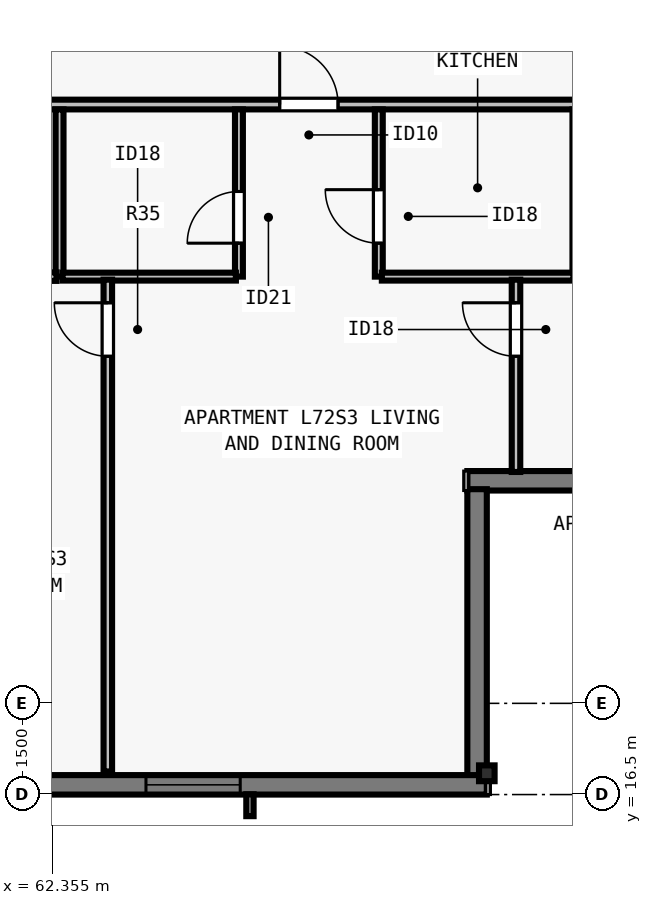
"""IFC4 building model, lengths in metres.
Left out: names, types, materials, properties, quantities, classifications, styles, units other than length and angle.
Written with IfcOpenShell. Run it as: python <this file> out.ifc"""

import sys

from ifc_helpers import new_model, si_unit, direction, frame, frame_2d, origin, origin_2d, place, context, subcontext, project, spatial, rectangle, i_section, extrude, element, fill, save


model = new_model("IFC4")
c1 = context("Model", 3, precision=1e-05, world=origin(), true_north=direction((0.0, 1.0)))
c2 = subcontext(c1, "Body", "Model", "MODEL_VIEW")
j1 = project(units=[si_unit("LENGTHUNIT", "METRE"), si_unit("PLANEANGLEUNIT", "RADIAN")], contexts=[c1])
p1 = place(None, origin())
s1 = spatial("IfcSite", under=j1, at=p1, CompositionType="ELEMENT")
p2 = place(p1, origin())
s2 = spatial("IfcBuilding", under=s1, at=p2, CompositionType="ELEMENT")
p3 = place(p2, frame((0.0, 0.0, 262.0)))
s3 = spatial("IfcBuildingStorey", under=s2, at=p3, CompositionType="ELEMENT", Elevation=262.0)
p4 = place(p3, frame((69.5, 16.85, 0.0), z_axis=(0.0, 0.0, 1.0), x_axis=(1.0, 0.0, 0.0)))
e1 = element("IfcColumn", 1, at=p4, inside=s3, PredefinedType="COLUMN", context=c2, shape_type="SweptSolid", body=[
    extrude(i_section(OverallWidth=0.256, OverallDepth=0.26, WebThickness=0.01, FlangeThickness=0.017, FilletRadius=0.013, at=origin_2d()), origin(), (0.0, 0.0, 1.0), 3.5),
])
p5 = place(p3, frame((74.5, 21.66, 0.0), z_axis=(0.0, 0.0, 1.0), x_axis=(-1.0, 0.0, 0.0)))
e2 = element("IfcWall", 2, at=p5, inside=s3, PredefinedType="SOLIDWALL", context=c2, shape_type="SweptSolid", body=[
    extrude(rectangle(XDim=5.32, YDim=0.32, at=frame_2d((2.66, 0.0))), origin(), (0.0, 0.0, 1.0), 3.29),
])
p6 = place(p5, frame((0.63, 0.0, 0.8)))
e3 = element("IfcOpeningElement", 3, at=p6, cuts=e2, PredefinedType="OPENING", context=c2, shape_type="SweptSolid", body=[
    extrude(rectangle(XDim=0.9, YDim=1.678, at=frame_2d((0.45, 0.839))), frame((0.0, 0.17, 0.0), z_axis=(0.0, -1.0, 0.0), x_axis=(1.0, 0.0, 0.0)), (0.0, 0.0, 1.0), 0.34),
])
p7 = place(p3, frame((69.34, 21.522, 0.0), z_axis=(0.0, 0.0, 1.0), x_axis=(0.0, -1.0, 0.0)))
e4 = element("IfcWall", 4, at=p7, inside=s3, PredefinedType="SOLIDWALL", context=c2, shape_type="SweptSolid", body=[
    extrude(rectangle(XDim=4.724, YDim=0.32, at=frame_2d((2.362, 0.0))), origin(), (0.0, 0.0, 1.0), 3.29),
])
p8 = place(p3, frame((69.5, 16.66, 0.0), z_axis=(0.0, 0.0, 1.0), x_axis=(-1.0, 0.0, 0.0)))
e5 = element("IfcWall", 5, at=p8, inside=s3, PredefinedType="SOLIDWALL", context=c2, shape_type="SweptSolid", body=[
    extrude(rectangle(XDim=23.402, YDim=0.32, at=frame_2d((11.701, 0.0))), origin(), (0.0, 0.0, 1.0), 3.29),
])
p9 = place(p8, frame((4.055, 0.0, 0.8)))
e6 = element("IfcOpeningElement", 6, at=p9, cuts=e5, PredefinedType="OPENING", context=c2, shape_type="SweptSolid", body=[
    extrude(rectangle(XDim=1.55, YDim=1.678, at=frame_2d((0.775, 0.839))), frame((0.0, 0.17, 0.0), z_axis=(0.0, -1.0, 0.0), x_axis=(1.0, 0.0, 0.0)), (0.0, 0.0, 1.0), 0.34),
])
p10 = place(p8, frame((7.966, 0.0, 0.8)))
e7 = element("IfcOpeningElement", 7, at=p10, cuts=e5, PredefinedType="OPENING", context=c2, shape_type="SweptSolid", body=[
    extrude(rectangle(XDim=1.85, YDim=1.678, at=frame_2d((0.925, 0.839))), frame((0.0, 0.17, 0.0), z_axis=(0.0, -1.0, 0.0), x_axis=(1.0, 0.0, 0.0)), (0.0, 0.0, 1.0), 0.34),
])
p11 = place(p8, frame((15.736, 0.0, 0.8)))
e8 = element("IfcOpeningElement", 8, at=p11, cuts=e5, PredefinedType="OPENING", context=c2, shape_type="SweptSolid", body=[
    extrude(rectangle(XDim=1.85, YDim=1.678, at=frame_2d((0.925, 0.839))), frame((0.0, 0.17, 0.0), z_axis=(0.0, -1.0, 0.0), x_axis=(1.0, 0.0, 0.0)), (0.0, 0.0, 1.0), 0.34),
])
p12 = place(p8, frame((18.297, 0.0, 0.8)))
e9 = element("IfcOpeningElement", 9, at=p12, cuts=e5, PredefinedType="OPENING", context=c2, shape_type="SweptSolid", body=[
    extrude(rectangle(XDim=1.55, YDim=1.678, at=frame_2d((0.775, 0.839))), frame((0.0, 0.17, 0.0), z_axis=(0.0, -1.0, 0.0), x_axis=(1.0, 0.0, 0.0)), (0.0, 0.0, 1.0), 0.34),
])
p13 = place(p8, frame((20.63, 0.0, 0.8)))
e10 = element("IfcOpeningElement", 10, at=p13, cuts=e5, PredefinedType="OPENING", context=c2, shape_type="SweptSolid", body=[
    extrude(rectangle(XDim=0.9, YDim=1.678, at=frame_2d((0.45, 0.839))), frame((0.0, 0.17, 0.0), z_axis=(0.0, -1.0, 0.0), x_axis=(1.0, 0.0, 0.0)), (0.0, 0.0, 1.0), 0.34),
])
p14 = place(p8, frame((10.87, 0.0, 0.8)))
e11 = element("IfcOpeningElement", 11, at=p14, cuts=e5, PredefinedType="OPENING", context=c2, shape_type="SweptSolid", body=[
    extrude(rectangle(XDim=0.9, YDim=1.678, at=frame_2d((0.45, 0.839))), frame((0.0, 0.17, 0.0), z_axis=(0.0, -1.0, 0.0), x_axis=(1.0, 0.0, 0.0)), (0.0, 0.0, 1.0), 0.34),
])
p15 = place(p3, frame((29.805, 27.847, 0.0), z_axis=(0.0, 0.0, 1.0), x_axis=(1.0, 0.0, 0.0)))
e12 = element("IfcWall", 12, at=p15, inside=s3, PredefinedType="PARTITIONING", context=c2, shape_type="SweptSolid", body=[
    extrude(rectangle(XDim=44.39, YDim=0.16, at=frame_2d((22.195, 0.0))), origin(), (0.0, 0.0, 1.0), 2.958),
])
p16 = place(p15, frame((7.206, 0.0, 0.0)))
e13 = element("IfcOpeningElement", 13, at=p16, cuts=e12, PredefinedType="OPENING", context=c2, shape_type="SweptSolid", body=[
    extrude(rectangle(XDim=0.96, YDim=2.18, at=frame_2d((0.48, 1.09))), frame((0.0, 0.09, 0.0), z_axis=(0.0, -1.0, 0.0), x_axis=(1.0, 0.0, 0.0)), (0.0, 0.0, 1.0), 0.18),
])
p17 = place(p15, frame((21.78, 0.0, 0.0)))
e14 = element("IfcOpeningElement", 14, at=p17, cuts=e12, PredefinedType="OPENING", context=c2, shape_type="SweptSolid", body=[
    extrude(rectangle(XDim=0.96, YDim=2.18, at=frame_2d((0.48, 1.09))), frame((0.0, 0.09, 0.0), z_axis=(0.0, -1.0, 0.0), x_axis=(1.0, 0.0, 0.0)), (0.0, 0.0, 1.0), 0.18),
])
p18 = place(p15, frame((36.289, 0.0, 0.0)))
e15 = element("IfcOpeningElement", 15, at=p18, cuts=e12, PredefinedType="OPENING", context=c2, shape_type="SweptSolid", body=[
    extrude(rectangle(XDim=0.96, YDim=2.18, at=frame_2d((0.48, 1.09))), frame((0.0, 0.09, 0.0), z_axis=(0.0, -1.0, 0.0), x_axis=(1.0, 0.0, 0.0)), (0.0, 0.0, 1.0), 0.18),
])
p19 = place(p3, frame((62.474, 25.018, 0.0), z_axis=(0.0, 0.0, 1.0), x_axis=(0.0, 1.0, 0.0)))
e16 = element("IfcWall", 16, at=p19, inside=s3, PredefinedType="PLUMBINGWALL", context=c2, shape_type="SweptSolid", body=[
    extrude(rectangle(XDim=2.75, YDim=0.13, at=frame_2d((1.375, 0.0))), origin(), (0.0, 0.0, 1.0), 2.573),
])
p20 = place(p3, frame((65.424, 25.018, 0.0), z_axis=(0.0, 0.0, 1.0), x_axis=(0.0, 1.0, 0.0)))
e17 = element("IfcWall", 17, at=p20, inside=s3, PredefinedType="PLUMBINGWALL", context=c2, shape_type="SweptSolid", body=[
    extrude(rectangle(XDim=2.75, YDim=0.13, at=frame_2d((1.375, 0.0))), origin(), (0.0, 0.0, 1.0), 3.29),
])
p21 = place(p20, frame((0.55, 0.0, 0.0)))
e18 = element("IfcOpeningElement", 18, at=p21, cuts=e17, PredefinedType="OPENING", context=c2, shape_type="SweptSolid", body=[
    extrude(rectangle(XDim=0.85, YDim=2.08, at=frame_2d((0.425, 1.04))), frame((0.0, 0.075, 0.0), z_axis=(0.0, -1.0, 0.0), x_axis=(1.0, 0.0, 0.0)), (0.0, 0.0, 1.0), 0.15),
])
p22 = place(p3, frame((62.524, 25.018, 0.0), z_axis=(0.0, 0.0, 1.0), x_axis=(1.0, 0.0, 0.0)))
e19 = element("IfcWall", 19, at=p22, inside=s3, PredefinedType="PLUMBINGWALL", context=c2, shape_type="SweptSolid", body=[
    extrude(rectangle(XDim=2.85, YDim=0.13, at=frame_2d((1.425, 0.0))), origin(), (0.0, 0.0, 1.0), 3.29),
])
p23 = place(p3, frame((67.724, 25.018, 0.0), z_axis=(0.0, 0.0, 1.0), x_axis=(0.0, 1.0, 0.0)))
e20 = element("IfcWall", 20, at=p23, inside=s3, PredefinedType="PLUMBINGWALL", context=c2, shape_type="SweptSolid", body=[
    extrude(rectangle(XDim=2.75, YDim=0.13, at=frame_2d((1.375, 0.0))), origin(), (0.0, 0.0, 1.0), 3.29),
])
p24 = place(p23, frame((0.55, 0.0, 0.0)))
e21 = element("IfcOpeningElement", 21, at=p24, cuts=e20, PredefinedType="OPENING", context=c2, shape_type="SweptSolid", body=[
    extrude(rectangle(XDim=0.88, YDim=2.1, at=frame_2d((0.44, 1.05))), frame((0.0, 0.075, 0.0), z_axis=(0.0, -1.0, 0.0), x_axis=(1.0, 0.0, 0.0)), (0.0, 0.0, 1.0), 0.15),
])
p25 = place(p3, frame((67.774, 25.018, 0.0), z_axis=(0.0, 0.0, 1.0), x_axis=(1.0, 0.0, 0.0)))
e22 = element("IfcWall", 22, at=p25, inside=s3, PredefinedType="PLUMBINGWALL", context=c2, shape_type="SweptSolid", body=[
    extrude(rectangle(XDim=3.15, YDim=0.13, at=frame_2d((1.575, 0.0))), origin(), (0.0, 0.0, 1.0), 2.958),
])
p26 = place(p3, frame((63.268, 16.88, 0.0), z_axis=(0.0, 0.0, 1.0), x_axis=(0.0, 1.0, 0.0)))
e23 = element("IfcWall", 23, at=p26, inside=s3, PredefinedType="PARTITIONING", context=c2, shape_type="SweptSolid", body=[
    extrude(rectangle(XDim=8.088, YDim=0.14, at=frame_2d((4.044, 0.0))), origin(), (0.0, 0.0, 1.0), 3.29),
])
p27 = place(p26, frame((6.827, 0.0, 0.0)))
e24 = element("IfcOpeningElement", 24, at=p27, cuts=e23, PredefinedType="OPENING", context=c2, shape_type="SweptSolid", body=[
    extrude(rectangle(XDim=0.88, YDim=2.1, at=frame_2d((0.44, 1.05))), frame((0.0, 0.08, 0.0), z_axis=(0.0, -1.0, 0.0), x_axis=(1.0, 0.0, 0.0)), (0.0, 0.0, 1.0), 0.16),
])
p28 = place(p3, frame((59.133, 25.018, 0.0), z_axis=(0.0, 0.0, 1.0), x_axis=(1.0, 0.0, 0.0)))
e25 = element("IfcWall", 25, at=p28, inside=s3, PredefinedType="PARTITIONING", context=c2, shape_type="SweptSolid", body=[
    extrude(rectangle(XDim=3.291, YDim=0.14, at=frame_2d((1.646, 0.0))), origin(), (0.0, 0.0, 1.0), 3.29),
])
p29 = place(p28, frame((0.335, 0.0, 0.0)))
e26 = element("IfcOpeningElement", 26, at=p29, cuts=e25, PredefinedType="OPENING", context=c2, shape_type="SweptSolid", body=[
    extrude(rectangle(XDim=0.82, YDim=2.1, at=frame_2d((0.41, 1.05))), frame((0.0, 0.08, 0.0), z_axis=(0.0, -1.0, 0.0), x_axis=(1.0, 0.0, 0.0)), (0.0, 0.0, 1.0), 0.16),
])
p30 = place(p3, frame((69.98, 21.805, 0.0), z_axis=(0.0, 0.0, 1.0), x_axis=(0.0, 1.0, 0.0)))
e27 = element("IfcWall", 27, at=p30, inside=s3, PredefinedType="PARTITIONING", context=c2, shape_type="SweptSolid", body=[
    extrude(rectangle(XDim=3.163, YDim=0.14, at=frame_2d((1.581, 0.0))), origin(), (0.0, 0.0, 1.0), 3.29),
])
p31 = place(p30, frame((1.903, 0.0, 0.0)))
e28 = element("IfcOpeningElement", 28, at=p31, cuts=e27, PredefinedType="OPENING", context=c2, shape_type="SweptSolid", body=[
    extrude(rectangle(XDim=0.88, YDim=2.1, at=frame_2d((0.44, 1.05))), frame((0.0, 0.08, 0.0), z_axis=(0.0, -1.0, 0.0), x_axis=(1.0, 0.0, 0.0)), (0.0, 0.0, 1.0), 0.16),
])
p32 = place(p9, origin())
e29 = element("IfcWindow", 29, at=p32, inside=s3, PartitioningType="SINGLE_PANEL", PredefinedType="WINDOW", context=c2, shape_type="SweptSolid", body=[
    extrude(rectangle(XDim=1.55, YDim=1.678, at=frame_2d((0.775, 0.839))), frame((0.0, -0.05, 0.0), z_axis=(0.0, -1.0, 0.0), x_axis=(1.0, 0.0, 0.0)), (0.0, 0.0, 1.0), 0.06),
])
fill(e6, e29)
p33 = place(p21, origin())
e30 = element("IfcDoor", 30, at=p33, inside=s3, OperationType="SINGLE_SWING_LEFT", PredefinedType="DOOR", context=c2, shape_type="SweptSolid", body=[
    extrude(rectangle(XDim=0.85, YDim=2.08, at=frame_2d((0.425, 1.04))), frame((0.0, 0.025, 0.0), z_axis=(0.0, -1.0, 0.0), x_axis=(1.0, 0.0, 0.0)), (0.0, 0.0, 1.0), 0.05),
])
fill(e18, e30)
p34 = place(p24, origin())
e31 = element("IfcDoor", 31, at=p34, inside=s3, OperationType="SINGLE_SWING_RIGHT", PredefinedType="DOOR", context=c2, shape_type="SweptSolid", body=[
    extrude(rectangle(XDim=0.88, YDim=2.1, at=frame_2d((0.44, 1.05))), frame((0.0, 0.025, 0.0), z_axis=(0.0, -1.0, 0.0), x_axis=(1.0, 0.0, 0.0)), (0.0, 0.0, 1.0), 0.05),
])
fill(e21, e31)
p35 = place(p27, origin())
e32 = element("IfcDoor", 32, at=p35, inside=s3, OperationType="SINGLE_SWING_RIGHT", PredefinedType="DOOR", context=c2, shape_type="SweptSolid", body=[
    extrude(rectangle(XDim=0.88, YDim=2.1, at=frame_2d((0.44, 1.05))), frame((0.0, 0.025, 0.0), z_axis=(0.0, -1.0, 0.0), x_axis=(1.0, 0.0, 0.0)), (0.0, 0.0, 1.0), 0.05),
])
fill(e24, e32)
p36 = place(p31, origin())
e33 = element("IfcDoor", 33, at=p36, inside=s3, OperationType="SINGLE_SWING_RIGHT", PredefinedType="DOOR", context=c2, shape_type="SweptSolid", body=[
    extrude(rectangle(XDim=0.88, YDim=2.1, at=frame_2d((0.44, 1.05))), frame((0.0, 0.025, 0.0), z_axis=(0.0, -1.0, 0.0), x_axis=(1.0, 0.0, 0.0)), (0.0, 0.0, 1.0), 0.05),
])
fill(e28, e33)
p37 = place(p18, origin())
e34 = element("IfcDoor", 34, at=p37, inside=s3, OperationType="SINGLE_SWING_LEFT", PredefinedType="DOOR", context=c2, shape_type="SweptSolid", body=[
    extrude(rectangle(XDim=0.96, YDim=2.18, at=frame_2d((0.48, 1.09))), frame((0.0, 0.025, 0.0), z_axis=(0.0, -1.0, 0.0), x_axis=(1.0, 0.0, 0.0)), (0.0, 0.0, 1.0), 0.05),
])
fill(e15, e34)
save(model, sys.argv[1])
